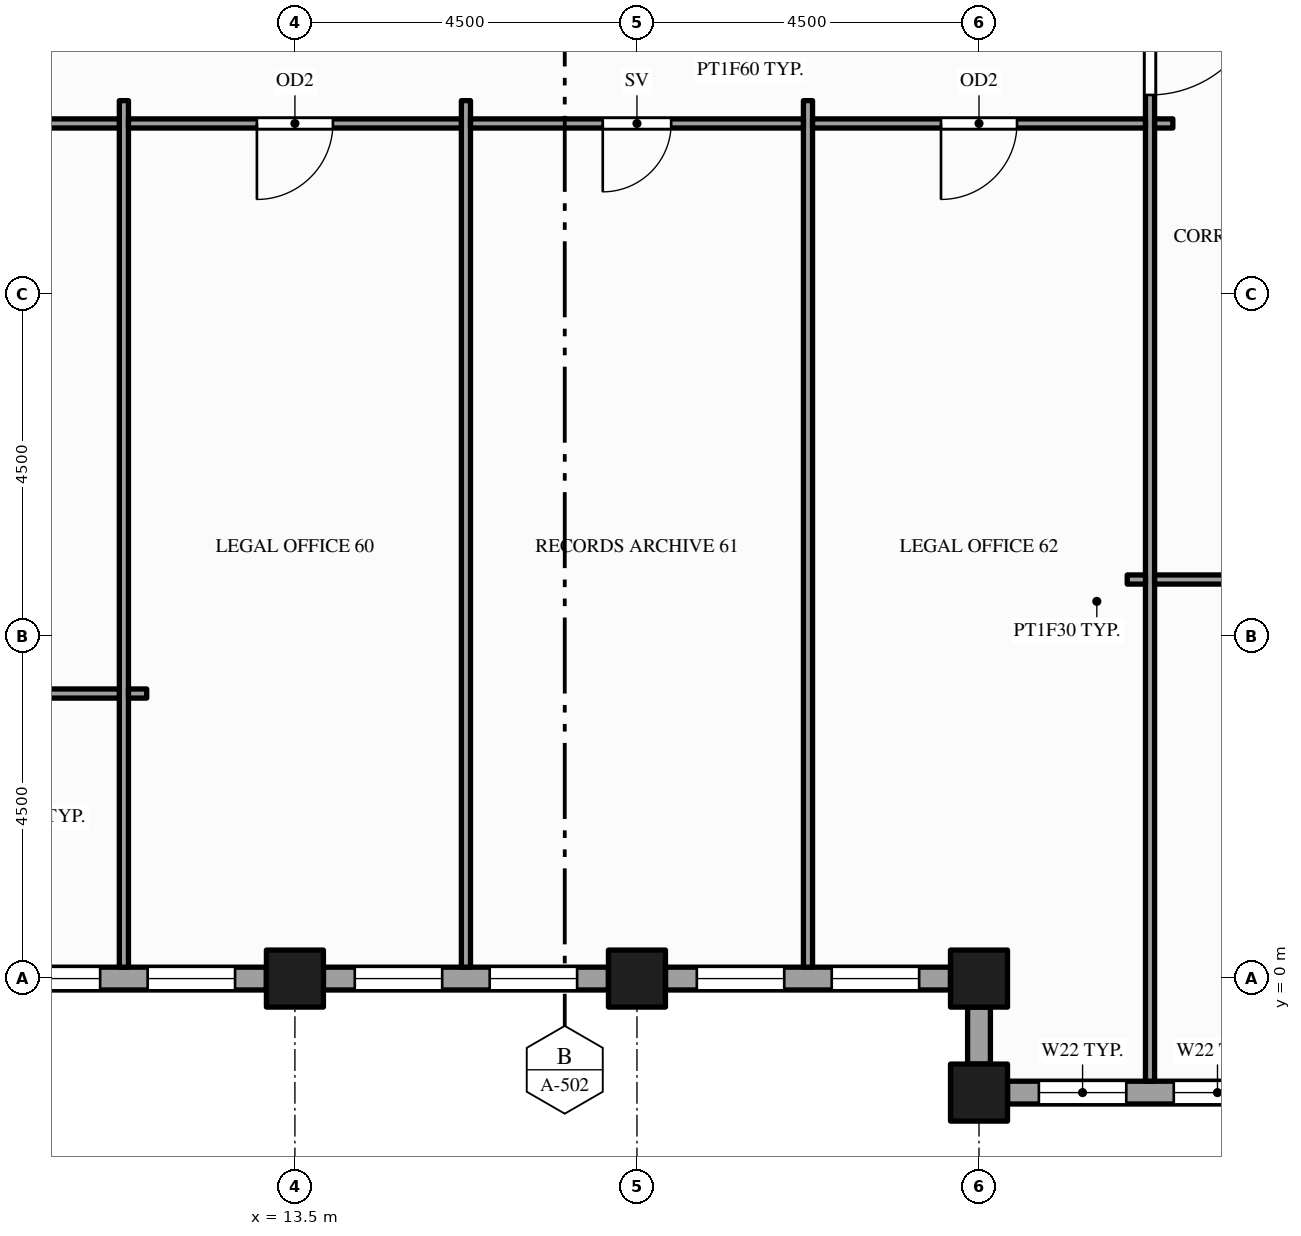
"""IFC4 building model, lengths in metres.
Left out: names, types, materials, properties, quantities, classifications, styles, units other than length and angle.
Written with IfcOpenShell. Run it as: python <this file> out.ifc"""

import sys

from ifc_helpers import new_model, si_unit, direction, frame, frame_2d, origin, origin_2d, place, context, subcontext, project, spatial, rectangle, hollow_rectangle, extrude, element, fill, save


model = new_model("IFC4")
c1 = context("Model", 3, precision=1e-05, world=origin(), true_north=direction((0.0, 1.0)))
c2 = subcontext(c1, "Body", "Model", "MODEL_VIEW")
j1 = project(units=[si_unit("LENGTHUNIT", "METRE"), si_unit("PLANEANGLEUNIT", "RADIAN")], contexts=[c1])
p1 = place(None, origin())
s1 = spatial("IfcSite", under=j1, at=p1, CompositionType="ELEMENT")
p2 = place(p1, origin())
s2 = spatial("IfcBuilding", under=s1, at=p2, CompositionType="ELEMENT")
p3 = place(p2, frame((0.0, 0.0, 235.0)))
s3 = spatial("IfcBuildingStorey", under=s2, at=p3, CompositionType="ELEMENT", Elevation=235.0)
for number, where, z_axis, x_axis in (
    (1, (13.5, 0.0, -0.15), (0.0, 0.0, 1.0), (1.0, 0.0, 0.0)),
    (2, (18.0, 0.0, -0.15), (0.0, 0.0, 1.0), (1.0, 0.0, 0.0)),
    (3, (22.5, -1.5, -0.15), (0.0, 0.0, 1.0), (1.0, 0.0, 0.0)),
    (4, (22.5, 0.0, -0.15), (0.0, 0.0, 1.0), (1.0, 0.0, 0.0)),
):
    element("IfcColumn", number, at=place(p3, frame(where, z_axis=z_axis, x_axis=x_axis)), inside=s3, PredefinedType="COLUMN", context=c2, shape_type="SweptSolid", body=[
        extrude(hollow_rectangle(XDim=0.75, YDim=0.75, WallThickness=0.036, at=origin_2d()), origin(), (0.0, 0.0, 1.0), 4.0),
    ])
p4 = place(p3, frame((22.875, -1.5, 0.0), z_axis=(0.0, 0.0, 1.0), x_axis=(1.0, 0.0, 0.0)))
e5 = element("IfcWall", 5, at=p4, inside=s3, PredefinedType="STANDARD", context=c2, shape_type="SweptSolid", body=[
    extrude(rectangle(XDim=3.75, YDim=0.3, at=frame_2d((1.875, 0.0))), origin(), (0.0, 0.0, 1.0), 2.76),
])
p5 = place(p4, frame((0.413, 0.0, 0.9)))
e6 = element("IfcOpeningElement", 6, at=p5, cuts=e5, PredefinedType="OPENING", context=c2, shape_type="SweptSolid", body=[
    extrude(rectangle(XDim=1.15, YDim=1.5, at=frame_2d((0.575, 0.75))), frame((0.0, 0.16, 0.0), z_axis=(0.0, -1.0, 0.0), x_axis=(1.0, 0.0, 0.0)), (0.0, 0.0, 1.0), 0.32),
])
p6 = place(p4, frame((2.188, 0.0, 0.9)))
e7 = element("IfcOpeningElement", 7, at=p6, cuts=e5, PredefinedType="OPENING", context=c2, shape_type="SweptSolid", body=[
    extrude(rectangle(XDim=1.15, YDim=1.5, at=frame_2d((0.575, 0.75))), frame((0.0, 0.16, 0.0), z_axis=(0.0, -1.0, 0.0), x_axis=(1.0, 0.0, 0.0)), (0.0, 0.0, 1.0), 0.32),
])
p7 = place(p3, frame((9.375, 0.0, 0.0), z_axis=(0.0, 0.0, 1.0), x_axis=(1.0, 0.0, 0.0)))
e8 = element("IfcWall", 8, at=p7, inside=s3, PredefinedType="STANDARD", context=c2, shape_type="SweptSolid", body=[
    extrude(rectangle(XDim=3.75, YDim=0.3, at=frame_2d((1.875, 0.0))), origin(), (0.0, 0.0, 1.0), 2.87),
])
p8 = place(p7, frame((0.413, 0.0, 0.9)))
e9 = element("IfcOpeningElement", 9, at=p8, cuts=e8, PredefinedType="OPENING", context=c2, shape_type="SweptSolid", body=[
    extrude(rectangle(XDim=1.15, YDim=1.75, at=frame_2d((0.575, 0.875))), frame((0.0, 0.16, 0.0), z_axis=(0.0, -1.0, 0.0), x_axis=(1.0, 0.0, 0.0)), (0.0, 0.0, 1.0), 0.32),
])
p9 = place(p7, frame((2.188, 0.0, 0.9)))
e10 = element("IfcOpeningElement", 10, at=p9, cuts=e8, PredefinedType="OPENING", context=c2, shape_type="SweptSolid", body=[
    extrude(rectangle(XDim=1.15, YDim=1.75, at=frame_2d((0.575, 0.875))), frame((0.0, 0.16, 0.0), z_axis=(0.0, -1.0, 0.0), x_axis=(1.0, 0.0, 0.0)), (0.0, 0.0, 1.0), 0.32),
])
p10 = place(p3, frame((13.875, 0.0, 0.0), z_axis=(0.0, 0.0, 1.0), x_axis=(1.0, 0.0, 0.0)))
e11 = element("IfcWall", 11, at=p10, inside=s3, PredefinedType="STANDARD", context=c2, shape_type="SweptSolid", body=[
    extrude(rectangle(XDim=3.75, YDim=0.3, at=frame_2d((1.875, 0.0))), origin(), (0.0, 0.0, 1.0), 2.87),
])
p11 = place(p10, frame((0.413, 0.0, 0.9)))
e12 = element("IfcOpeningElement", 12, at=p11, cuts=e11, PredefinedType="OPENING", context=c2, shape_type="SweptSolid", body=[
    extrude(rectangle(XDim=1.15, YDim=1.75, at=frame_2d((0.575, 0.875))), frame((0.0, 0.16, 0.0), z_axis=(0.0, -1.0, 0.0), x_axis=(1.0, 0.0, 0.0)), (0.0, 0.0, 1.0), 0.32),
])
p12 = place(p10, frame((2.188, 0.0, 0.9)))
e13 = element("IfcOpeningElement", 13, at=p12, cuts=e11, PredefinedType="OPENING", context=c2, shape_type="SweptSolid", body=[
    extrude(rectangle(XDim=1.15, YDim=1.75, at=frame_2d((0.575, 0.875))), frame((0.0, 0.16, 0.0), z_axis=(0.0, -1.0, 0.0), x_axis=(1.0, 0.0, 0.0)), (0.0, 0.0, 1.0), 0.32),
])
p13 = place(p3, frame((18.375, 0.0, 0.0), z_axis=(0.0, 0.0, 1.0), x_axis=(1.0, 0.0, 0.0)))
e14 = element("IfcWall", 14, at=p13, inside=s3, PredefinedType="STANDARD", context=c2, shape_type="SweptSolid", body=[
    extrude(rectangle(XDim=3.75, YDim=0.3, at=frame_2d((1.875, 0.0))), origin(), (0.0, 0.0, 1.0), 2.87),
])
p14 = place(p13, frame((0.413, 0.0, 0.9)))
e15 = element("IfcOpeningElement", 15, at=p14, cuts=e14, PredefinedType="OPENING", context=c2, shape_type="SweptSolid", body=[
    extrude(rectangle(XDim=1.15, YDim=1.75, at=frame_2d((0.575, 0.875))), frame((0.0, 0.16, 0.0), z_axis=(0.0, -1.0, 0.0), x_axis=(1.0, 0.0, 0.0)), (0.0, 0.0, 1.0), 0.32),
])
p15 = place(p13, frame((2.188, 0.0, 0.9)))
e16 = element("IfcOpeningElement", 16, at=p15, cuts=e14, PredefinedType="OPENING", context=c2, shape_type="SweptSolid", body=[
    extrude(rectangle(XDim=1.15, YDim=1.75, at=frame_2d((0.575, 0.875))), frame((0.0, 0.16, 0.0), z_axis=(0.0, -1.0, 0.0), x_axis=(1.0, 0.0, 0.0)), (0.0, 0.0, 1.0), 0.32),
])
p16 = place(p3, frame((22.5, -0.375, 0.0), z_axis=(0.0, 0.0, 1.0), x_axis=(0.0, -1.0, 0.0)))
e17 = element("IfcWall", 17, at=p16, inside=s3, PredefinedType="STANDARD", context=c2, shape_type="SweptSolid", body=[
    extrude(rectangle(XDim=0.75, YDim=0.3, at=frame_2d((0.375, 0.0))), origin(), (0.0, 0.0, 1.0), 3.157),
])
for number, where, z_axis, x_axis in (
    (18, (11.25, 0.15, 0.0), (0.0, 0.0, 1.0), (0.0, 1.0, 0.0)),
    (19, (15.75, 0.15, 0.0), (0.0, 0.0, 1.0), (0.0, 1.0, 0.0)),
    (20, (20.25, 0.15, 0.0), (0.0, 0.0, 1.0), (0.0, 1.0, 0.0)),
):
    element("IfcWall", number, at=place(p3, frame(where, z_axis=z_axis, x_axis=x_axis)), inside=s3, PredefinedType="PARTITIONING", context=c2, shape_type="SweptSolid", body=[
        extrude(rectangle(XDim=11.4, YDim=0.12, at=frame_2d((5.7, 0.0))), origin(), (0.0, 0.0, 1.0), 2.87),
    ])
p17 = place(p3, frame((24.75, -1.35, 0.0), z_axis=(0.0, 0.0, 1.0), x_axis=(0.0, 1.0, 0.0)))
e21 = element("IfcWall", 21, at=p17, inside=s3, PredefinedType="PARTITIONING", context=c2, shape_type="SweptSolid", body=[
    extrude(rectangle(XDim=24.101, YDim=0.12, at=frame_2d((12.05, 0.0))), origin(), (0.0, 0.0, 1.0), 2.76),
])
p18 = place(p17, frame((12.975, 0.0, 0.0)))
e22 = element("IfcOpeningElement", 22, at=p18, cuts=e21, PredefinedType="OPENING", context=c2, shape_type="SweptSolid", body=[
    extrude(rectangle(XDim=1.5, YDim=2.1, at=frame_2d((0.75, 1.05))), frame((0.0, 0.07, 0.0), z_axis=(0.0, -1.0, 0.0), x_axis=(1.0, 0.0, 0.0)), (0.0, 0.0, 1.0), 0.14),
])
p19 = place(p3, frame((9.125, 3.75, 0.0), z_axis=(0.0, 0.0, 1.0), x_axis=(1.0, 0.0, 0.0)))
e23 = element("IfcWall", 23, at=p19, inside=s3, PredefinedType="PARTITIONING", context=c2, shape_type="SweptSolid", body=[
    extrude(rectangle(XDim=2.065, YDim=0.12, at=frame_2d((1.032, 0.0))), origin(), (0.0, 0.0, 1.0), 2.87),
])
p20 = place(p3, frame((11.31, 3.75, 0.0), z_axis=(0.0, 0.0, 1.0), x_axis=(1.0, 0.0, 0.0)))
e24 = element("IfcWall", 24, at=p20, inside=s3, PredefinedType="PARTITIONING", context=c2, shape_type="SweptSolid", body=[
    extrude(rectangle(XDim=0.24, YDim=0.12, at=frame_2d((0.12, 0.0))), origin(), (0.0, 0.0, 1.0), 2.87),
])
p21 = place(p3, frame((24.45, 5.25, 0.0), z_axis=(0.0, 0.0, 1.0), x_axis=(1.0, 0.0, 0.0)))
e25 = element("IfcWall", 25, at=p21, inside=s3, PredefinedType="PARTITIONING", context=c2, shape_type="SweptSolid", body=[
    extrude(rectangle(XDim=0.24, YDim=0.12, at=frame_2d((0.12, 0.0))), origin(), (0.0, 0.0, 1.0), 2.76),
])
p22 = place(p3, frame((24.81, 5.25, 0.0), z_axis=(0.0, 0.0, 1.0), x_axis=(1.0, 0.0, 0.0)))
e26 = element("IfcWall", 26, at=p22, inside=s3, PredefinedType="PARTITIONING", context=c2, shape_type="SweptSolid", body=[
    extrude(rectangle(XDim=2.13, YDim=0.12, at=frame_2d((1.065, 0.0))), origin(), (0.0, 0.0, 1.0), 2.76),
])
p23 = place(p3, frame((0.15, 11.25, 0.0), z_axis=(0.0, 0.0, 1.0), x_axis=(1.0, 0.0, 0.0)))
e27 = element("IfcWall", 27, at=p23, inside=s3, PredefinedType="PARTITIONING", context=c2, shape_type="SweptSolid", body=[
    extrude(rectangle(XDim=11.04, YDim=0.12, at=frame_2d((5.52, 0.0))), origin(), (0.0, 0.0, 1.0), 2.87),
])
p24 = place(p23, frame((4.93, 0.0, 0.0)))
e28 = element("IfcOpeningElement", 28, at=p24, cuts=e27, PredefinedType="OPENING", context=c2, shape_type="SweptSolid", body=[
    extrude(rectangle(XDim=1.2, YDim=2.1, at=frame_2d((0.6, 1.05))), frame((0.0, 0.07, 0.0), z_axis=(0.0, -1.0, 0.0), x_axis=(1.0, 0.0, 0.0)), (0.0, 0.0, 1.0), 0.14),
])
p25 = place(p3, frame((11.31, 11.25, 0.0), z_axis=(0.0, 0.0, 1.0), x_axis=(1.0, 0.0, 0.0)))
e29 = element("IfcWall", 29, at=p25, inside=s3, PredefinedType="PARTITIONING", context=c2, shape_type="SweptSolid", body=[
    extrude(rectangle(XDim=4.38, YDim=0.12, at=frame_2d((2.19, 0.0))), origin(), (0.0, 0.0, 1.0), 2.87),
])
p26 = place(p25, frame((1.69, 0.0, 0.0)))
e30 = element("IfcOpeningElement", 30, at=p26, cuts=e29, PredefinedType="OPENING", context=c2, shape_type="SweptSolid", body=[
    extrude(rectangle(XDim=1.0, YDim=2.1, at=frame_2d((0.5, 1.05))), frame((0.0, 0.07, 0.0), z_axis=(0.0, -1.0, 0.0), x_axis=(1.0, 0.0, 0.0)), (0.0, 0.0, 1.0), 0.14),
])
p27 = place(p3, frame((15.81, 11.25, 0.0), z_axis=(0.0, 0.0, 1.0), x_axis=(1.0, 0.0, 0.0)))
e31 = element("IfcWall", 31, at=p27, inside=s3, PredefinedType="PARTITIONING", context=c2, shape_type="SweptSolid", body=[
    extrude(rectangle(XDim=4.38, YDim=0.12, at=frame_2d((2.19, 0.0))), origin(), (0.0, 0.0, 1.0), 2.87),
])
p28 = place(p27, frame((1.74, 0.0, 0.0)))
e32 = element("IfcOpeningElement", 32, at=p28, cuts=e31, PredefinedType="OPENING", context=c2, shape_type="SweptSolid", body=[
    extrude(rectangle(XDim=0.9, YDim=2.1, at=frame_2d((0.45, 1.05))), frame((0.0, 0.07, 0.0), z_axis=(0.0, -1.0, 0.0), x_axis=(1.0, 0.0, 0.0)), (0.0, 0.0, 1.0), 0.14),
])
p29 = place(p3, frame((20.31, 11.25, 0.0), z_axis=(0.0, 0.0, 1.0), x_axis=(1.0, 0.0, 0.0)))
e33 = element("IfcWall", 33, at=p29, inside=s3, PredefinedType="PARTITIONING", context=c2, shape_type="SweptSolid", body=[
    extrude(rectangle(XDim=4.38, YDim=0.12, at=frame_2d((2.19, 0.0))), origin(), (0.0, 0.0, 1.0), 2.76),
])
p30 = place(p29, frame((1.69, 0.0, 0.0)))
e34 = element("IfcOpeningElement", 34, at=p30, cuts=e33, PredefinedType="OPENING", context=c2, shape_type="SweptSolid", body=[
    extrude(rectangle(XDim=1.0, YDim=2.1, at=frame_2d((0.5, 1.05))), frame((0.0, 0.07, 0.0), z_axis=(0.0, -1.0, 0.0), x_axis=(1.0, 0.0, 0.0)), (0.0, 0.0, 1.0), 0.14),
])
p31 = place(p3, frame((24.81, 11.25, 0.0), z_axis=(0.0, 0.0, 1.0), x_axis=(1.0, 0.0, 0.0)))
e35 = element("IfcWall", 35, at=p31, inside=s3, PredefinedType="PARTITIONING", context=c2, shape_type="SweptSolid", body=[
    extrude(rectangle(XDim=0.24, YDim=0.12, at=frame_2d((0.12, 0.0))), origin(), (0.0, 0.0, 1.0), 2.76),
])
p32 = place(p5, origin())
e36 = element("IfcWindow", 36, at=p32, inside=s3, PartitioningType="SINGLE_PANEL", PredefinedType="WINDOW", context=c2, shape_type="SweptSolid", body=[
    extrude(rectangle(XDim=1.15, YDim=1.5, at=frame_2d((0.575, 0.75))), frame((0.0, 0.03, 0.0), z_axis=(0.0, -1.0, 0.0), x_axis=(1.0, 0.0, 0.0)), (0.0, 0.0, 1.0), 0.06),
])
fill(e6, e36)
p33 = place(p6, origin())
e37 = element("IfcWindow", 37, at=p33, inside=s3, PartitioningType="SINGLE_PANEL", PredefinedType="WINDOW", context=c2, shape_type="SweptSolid", body=[
    extrude(rectangle(XDim=1.15, YDim=1.5, at=frame_2d((0.575, 0.75))), frame((0.0, 0.03, 0.0), z_axis=(0.0, -1.0, 0.0), x_axis=(1.0, 0.0, 0.0)), (0.0, 0.0, 1.0), 0.06),
])
fill(e7, e37)
p34 = place(p8, origin())
e38 = element("IfcWindow", 38, at=p34, inside=s3, PartitioningType="SINGLE_PANEL", PredefinedType="WINDOW", context=c2, shape_type="SweptSolid", body=[
    extrude(rectangle(XDim=1.15, YDim=1.75, at=frame_2d((0.575, 0.875))), frame((0.0, 0.03, 0.0), z_axis=(0.0, -1.0, 0.0), x_axis=(1.0, 0.0, 0.0)), (0.0, 0.0, 1.0), 0.06),
])
fill(e9, e38)
p35 = place(p9, origin())
e39 = element("IfcWindow", 39, at=p35, inside=s3, PartitioningType="SINGLE_PANEL", PredefinedType="WINDOW", context=c2, shape_type="SweptSolid", body=[
    extrude(rectangle(XDim=1.15, YDim=1.75, at=frame_2d((0.575, 0.875))), frame((0.0, 0.03, 0.0), z_axis=(0.0, -1.0, 0.0), x_axis=(1.0, 0.0, 0.0)), (0.0, 0.0, 1.0), 0.06),
])
fill(e10, e39)
p36 = place(p11, origin())
e40 = element("IfcWindow", 40, at=p36, inside=s3, PartitioningType="SINGLE_PANEL", PredefinedType="WINDOW", context=c2, shape_type="SweptSolid", body=[
    extrude(rectangle(XDim=1.15, YDim=1.75, at=frame_2d((0.575, 0.875))), frame((0.0, 0.03, 0.0), z_axis=(0.0, -1.0, 0.0), x_axis=(1.0, 0.0, 0.0)), (0.0, 0.0, 1.0), 0.06),
])
fill(e12, e40)
p37 = place(p12, origin())
e41 = element("IfcWindow", 41, at=p37, inside=s3, PartitioningType="SINGLE_PANEL", PredefinedType="WINDOW", context=c2, shape_type="SweptSolid", body=[
    extrude(rectangle(XDim=1.15, YDim=1.75, at=frame_2d((0.575, 0.875))), frame((0.0, 0.03, 0.0), z_axis=(0.0, -1.0, 0.0), x_axis=(1.0, 0.0, 0.0)), (0.0, 0.0, 1.0), 0.06),
])
fill(e13, e41)
p38 = place(p14, origin())
e42 = element("IfcWindow", 42, at=p38, inside=s3, PartitioningType="SINGLE_PANEL", PredefinedType="WINDOW", context=c2, shape_type="SweptSolid", body=[
    extrude(rectangle(XDim=1.15, YDim=1.75, at=frame_2d((0.575, 0.875))), frame((0.0, 0.03, 0.0), z_axis=(0.0, -1.0, 0.0), x_axis=(1.0, 0.0, 0.0)), (0.0, 0.0, 1.0), 0.06),
])
fill(e15, e42)
p39 = place(p15, origin())
e43 = element("IfcWindow", 43, at=p39, inside=s3, PartitioningType="SINGLE_PANEL", PredefinedType="WINDOW", context=c2, shape_type="SweptSolid", body=[
    extrude(rectangle(XDim=1.15, YDim=1.75, at=frame_2d((0.575, 0.875))), frame((0.0, 0.03, 0.0), z_axis=(0.0, -1.0, 0.0), x_axis=(1.0, 0.0, 0.0)), (0.0, 0.0, 1.0), 0.06),
])
fill(e16, e43)
p40 = place(p18, origin())
e44 = element("IfcDoor", 44, at=p40, inside=s3, OperationType="SINGLE_SWING_RIGHT", PredefinedType="DOOR", context=c2, shape_type="SweptSolid", body=[
    extrude(rectangle(XDim=1.5, YDim=2.1, at=frame_2d((0.75, 1.05))), frame((0.0, 0.025, 0.0), z_axis=(0.0, -1.0, 0.0), x_axis=(1.0, 0.0, 0.0)), (0.0, 0.0, 1.0), 0.05),
])
fill(e22, e44)
p41 = place(p26, origin())
e45 = element("IfcDoor", 45, at=p41, inside=s3, OperationType="SINGLE_SWING_LEFT", PredefinedType="DOOR", context=c2, shape_type="SweptSolid", body=[
    extrude(rectangle(XDim=1.0, YDim=2.1, at=frame_2d((0.5, 1.05))), frame((0.0, 0.025, 0.0), z_axis=(0.0, -1.0, 0.0), x_axis=(1.0, 0.0, 0.0)), (0.0, 0.0, 1.0), 0.05),
])
fill(e30, e45)
p42 = place(p28, origin())
e46 = element("IfcDoor", 46, at=p42, inside=s3, OperationType="SINGLE_SWING_LEFT", PredefinedType="DOOR", context=c2, shape_type="SweptSolid", body=[
    extrude(rectangle(XDim=0.9, YDim=2.1, at=frame_2d((0.45, 1.05))), frame((0.0, 0.025, 0.0), z_axis=(0.0, -1.0, 0.0), x_axis=(1.0, 0.0, 0.0)), (0.0, 0.0, 1.0), 0.05),
])
fill(e32, e46)
p43 = place(p30, origin())
e47 = element("IfcDoor", 47, at=p43, inside=s3, OperationType="SINGLE_SWING_LEFT", PredefinedType="DOOR", context=c2, shape_type="SweptSolid", body=[
    extrude(rectangle(XDim=1.0, YDim=2.1, at=frame_2d((0.5, 1.05))), frame((0.0, 0.025, 0.0), z_axis=(0.0, -1.0, 0.0), x_axis=(1.0, 0.0, 0.0)), (0.0, 0.0, 1.0), 0.05),
])
fill(e34, e47)
save(model, sys.argv[1])
